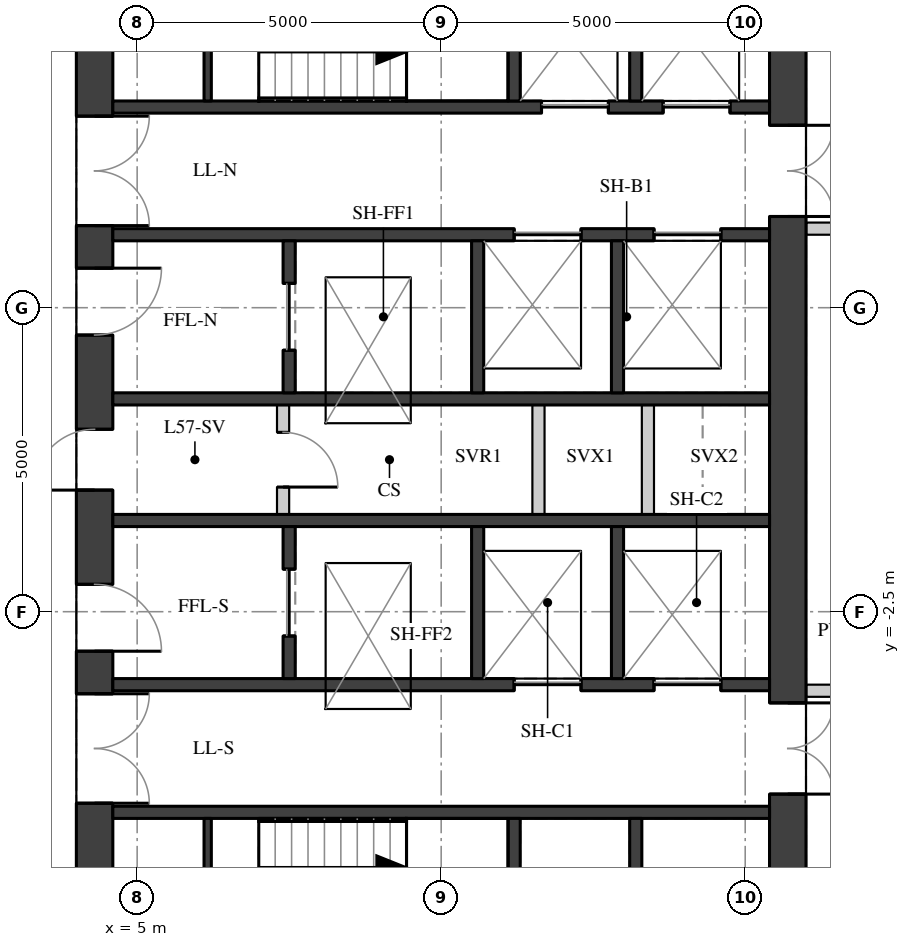
"""IFC4 building model, lengths in metres.
Left out: names, types, materials, properties, quantities, classifications, styles, units other than length and angle.
Written with IfcOpenShell. Run it as: python <this file> out.ifc"""

import sys

from ifc_helpers import new_model, si_unit, direction, frame, frame_2d, origin, place, context, subcontext, project, spatial, rectangle, extrude, element, fill, save


model = new_model("IFC4")
c1 = context("Model", 3, precision=1e-05, world=origin(), true_north=direction((0.0, 1.0)))
c2 = subcontext(c1, "Body", "Model", "MODEL_VIEW")
j1 = project(units=[si_unit("LENGTHUNIT", "METRE"), si_unit("PLANEANGLEUNIT", "RADIAN")], contexts=[c1])
p1 = place(None, origin())
s1 = spatial("IfcSite", under=j1, at=p1, CompositionType="ELEMENT")
p2 = place(p1, origin())
s2 = spatial("IfcBuilding", under=s1, at=p2, CompositionType="ELEMENT")
p3 = place(p2, frame((0.0, 0.0, 202.4)))
s3 = spatial("IfcBuildingStorey", under=s2, at=p3, CompositionType="ELEMENT", Elevation=202.4)
p4 = place(p3, frame((4.3, -9.4, 0.0), z_axis=(0.0, 0.0, 1.0), x_axis=(0.0, 1.0, 0.0)))
e1 = element("IfcWall", 1, at=p4, inside=s3, PredefinedType="SHEAR", context=c2, shape_type="SweptSolid", body=[
    extrude(rectangle(XDim=18.8, YDim=0.6, at=frame_2d((9.4, 0.0))), origin(), (0.0, 0.0, 1.0), 3.02),
])
p5 = place(p4, frame((0.65, 0.0, 0.0)))
e2 = element("IfcOpeningElement", 2, at=p5, cuts=e1, PredefinedType="OPENING", context=c2, shape_type="SweptSolid", body=[
    extrude(rectangle(XDim=1.5, YDim=2.1, at=frame_2d((0.75, 1.05))), frame((0.0, 0.31, 0.0), z_axis=(0.0, -1.0, 0.0), x_axis=(1.0, 0.0, 0.0)), (0.0, 0.0, 1.0), 0.62),
])
p6 = place(p4, frame((3.75, 0.0, 0.0)))
e3 = element("IfcOpeningElement", 3, at=p6, cuts=e1, PredefinedType="OPENING", context=c2, shape_type="SweptSolid", body=[
    extrude(rectangle(XDim=1.8, YDim=2.1, at=frame_2d((0.9, 1.05))), frame((0.0, 0.31, 0.0), z_axis=(0.0, -1.0, 0.0), x_axis=(1.0, 0.0, 0.0)), (0.0, 0.0, 1.0), 0.62),
])
p7 = place(p4, frame((6.25, 0.0, 0.0)))
e4 = element("IfcOpeningElement", 4, at=p7, cuts=e1, PredefinedType="OPENING", context=c2, shape_type="SweptSolid", body=[
    extrude(rectangle(XDim=1.1, YDim=2.1, at=frame_2d((0.55, 1.05))), frame((0.0, 0.31, 0.0), z_axis=(0.0, -1.0, 0.0), x_axis=(1.0, 0.0, 0.0)), (0.0, 0.0, 1.0), 0.62),
])
p8 = place(p4, frame((8.9, 0.0, 0.0)))
e5 = element("IfcOpeningElement", 5, at=p8, cuts=e1, PredefinedType="OPENING", context=c2, shape_type="SweptSolid", body=[
    extrude(rectangle(XDim=1.0, YDim=2.1, at=frame_2d((0.5, 1.05))), frame((0.0, 0.31, 0.0), z_axis=(0.0, -1.0, 0.0), x_axis=(1.0, 0.0, 0.0)), (0.0, 0.0, 1.0), 0.62),
])
p9 = place(p4, frame((11.45, 0.0, 0.0)))
e6 = element("IfcOpeningElement", 6, at=p9, cuts=e1, PredefinedType="OPENING", context=c2, shape_type="SweptSolid", body=[
    extrude(rectangle(XDim=1.1, YDim=2.1, at=frame_2d((0.55, 1.05))), frame((0.0, 0.31, 0.0), z_axis=(0.0, -1.0, 0.0), x_axis=(1.0, 0.0, 0.0)), (0.0, 0.0, 1.0), 0.62),
])
p10 = place(p4, frame((13.25, 0.0, 0.0)))
e7 = element("IfcOpeningElement", 7, at=p10, cuts=e1, PredefinedType="OPENING", context=c2, shape_type="SweptSolid", body=[
    extrude(rectangle(XDim=1.8, YDim=2.1, at=frame_2d((0.9, 1.05))), frame((0.0, 0.31, 0.0), z_axis=(0.0, -1.0, 0.0), x_axis=(1.0, 0.0, 0.0)), (0.0, 0.0, 1.0), 0.62),
])
p11 = place(p4, frame((16.65, 0.0, 0.0)))
e8 = element("IfcOpeningElement", 8, at=p11, cuts=e1, PredefinedType="OPENING", context=c2, shape_type="SweptSolid", body=[
    extrude(rectangle(XDim=1.5, YDim=2.1, at=frame_2d((0.75, 1.05))), frame((0.0, 0.31, 0.0), z_axis=(0.0, -1.0, 0.0), x_axis=(1.0, 0.0, 0.0)), (0.0, 0.0, 1.0), 0.62),
])
p12 = place(p3, frame((15.7, -9.4, 0.0), z_axis=(0.0, 0.0, 1.0), x_axis=(0.0, 1.0, 0.0)))
e9 = element("IfcWall", 9, at=p12, inside=s3, PredefinedType="SHEAR", context=c2, shape_type="SweptSolid", body=[
    extrude(rectangle(XDim=18.8, YDim=0.6, at=frame_2d((9.4, 0.0))), origin(), (0.0, 0.0, 1.0), 3.02),
])
p13 = place(p12, frame((13.4, 0.0, 0.0)))
e10 = element("IfcOpeningElement", 10, at=p13, cuts=e9, PredefinedType="OPENING", context=c2, shape_type="SweptSolid", body=[
    extrude(rectangle(XDim=1.5, YDim=2.1, at=frame_2d((0.75, 1.05))), frame((0.0, 0.31, 0.0), z_axis=(0.0, -1.0, 0.0), x_axis=(1.0, 0.0, 0.0)), (0.0, 0.0, 1.0), 0.62),
])
p14 = place(p12, frame((3.9, 0.0, 0.0)))
e11 = element("IfcOpeningElement", 11, at=p14, cuts=e9, PredefinedType="OPENING", context=c2, shape_type="SweptSolid", body=[
    extrude(rectangle(XDim=1.5, YDim=2.1, at=frame_2d((0.75, 1.05))), frame((0.0, 0.31, 0.0), z_axis=(0.0, -1.0, 0.0), x_axis=(1.0, 0.0, 0.0)), (0.0, 0.0, 1.0), 0.62),
])
p15 = place(p3, frame((4.6, 5.8, 0.0), z_axis=(0.0, 0.0, 1.0), x_axis=(1.0, 0.0, 0.0)))
e12 = element("IfcWall", 12, at=p15, inside=s3, PredefinedType="SHEAR", context=c2, shape_type="SweptSolid", body=[
    extrude(rectangle(XDim=10.8, YDim=0.2, at=frame_2d((5.4, 0.0))), origin(), (0.0, 0.0, 1.0), 3.02),
])
p16 = place(p15, frame((7.05, 0.0, 0.0)))
e13 = element("IfcOpeningElement", 13, at=p16, cuts=e12, PredefinedType="OPENING", context=c2, shape_type="SweptSolid", body=[
    extrude(rectangle(XDim=1.1, YDim=2.1, at=frame_2d((0.55, 1.05))), frame((0.0, 0.11, 0.0), z_axis=(0.0, -1.0, 0.0), x_axis=(1.0, 0.0, 0.0)), (0.0, 0.0, 1.0), 0.22),
])
p17 = place(p15, frame((9.05, 0.0, 0.0)))
e14 = element("IfcOpeningElement", 14, at=p17, cuts=e12, PredefinedType="OPENING", context=c2, shape_type="SweptSolid", body=[
    extrude(rectangle(XDim=1.1, YDim=2.1, at=frame_2d((0.55, 1.05))), frame((0.0, 0.11, 0.0), z_axis=(0.0, -1.0, 0.0), x_axis=(1.0, 0.0, 0.0)), (0.0, 0.0, 1.0), 0.22),
])
p18 = place(p3, frame((4.6, 3.7, 0.0), z_axis=(0.0, 0.0, 1.0), x_axis=(1.0, 0.0, 0.0)))
e15 = element("IfcWall", 15, at=p18, inside=s3, PredefinedType="SHEAR", context=c2, shape_type="SweptSolid", body=[
    extrude(rectangle(XDim=10.8, YDim=0.2, at=frame_2d((5.4, 0.0))), origin(), (0.0, 0.0, 1.0), 3.02),
])
p19 = place(p18, frame((6.6, 0.0, 0.0)))
e16 = element("IfcOpeningElement", 16, at=p19, cuts=e15, PredefinedType="OPENING", context=c2, shape_type="SweptSolid", body=[
    extrude(rectangle(XDim=1.1, YDim=2.1, at=frame_2d((0.55, 1.05))), frame((0.0, 0.11, 0.0), z_axis=(0.0, -1.0, 0.0), x_axis=(1.0, 0.0, 0.0)), (0.0, 0.0, 1.0), 0.22),
])
p20 = place(p18, frame((8.9, 0.0, 0.0)))
e17 = element("IfcOpeningElement", 17, at=p20, cuts=e15, PredefinedType="OPENING", context=c2, shape_type="SweptSolid", body=[
    extrude(rectangle(XDim=1.1, YDim=2.1, at=frame_2d((0.55, 1.05))), frame((0.0, 0.11, 0.0), z_axis=(0.0, -1.0, 0.0), x_axis=(1.0, 0.0, 0.0)), (0.0, 0.0, 1.0), 0.22),
])
for number, where, z_axis, x_axis in (
    (18, (4.6, 1.0, 0.0), (0.0, 0.0, 1.0), (1.0, 0.0, 0.0)),
    (19, (4.6, -1.0, 0.0), (0.0, 0.0, 1.0), (1.0, 0.0, 0.0)),
):
    element("IfcWall", number, at=place(p3, frame(where, z_axis=z_axis, x_axis=x_axis)), inside=s3, PredefinedType="SHEAR", context=c2, shape_type="SweptSolid", body=[
        extrude(rectangle(XDim=10.8, YDim=0.2, at=frame_2d((5.4, 0.0))), origin(), (0.0, 0.0, 1.0), 3.02),
    ])
p21 = place(p3, frame((4.6, -3.7, 0.0), z_axis=(0.0, 0.0, 1.0), x_axis=(1.0, 0.0, 0.0)))
e20 = element("IfcWall", 20, at=p21, inside=s3, PredefinedType="SHEAR", context=c2, shape_type="SweptSolid", body=[
    extrude(rectangle(XDim=10.8, YDim=0.2, at=frame_2d((5.4, 0.0))), origin(), (0.0, 0.0, 1.0), 3.02),
])
p22 = place(p21, frame((6.6, 0.0, 0.0)))
e21 = element("IfcOpeningElement", 21, at=p22, cuts=e20, PredefinedType="OPENING", context=c2, shape_type="SweptSolid", body=[
    extrude(rectangle(XDim=1.1, YDim=2.1, at=frame_2d((0.55, 1.05))), frame((0.0, 0.11, 0.0), z_axis=(0.0, -1.0, 0.0), x_axis=(1.0, 0.0, 0.0)), (0.0, 0.0, 1.0), 0.22),
])
p23 = place(p21, frame((8.9, 0.0, 0.0)))
e22 = element("IfcOpeningElement", 22, at=p23, cuts=e20, PredefinedType="OPENING", context=c2, shape_type="SweptSolid", body=[
    extrude(rectangle(XDim=1.1, YDim=2.1, at=frame_2d((0.55, 1.05))), frame((0.0, 0.11, 0.0), z_axis=(0.0, -1.0, 0.0), x_axis=(1.0, 0.0, 0.0)), (0.0, 0.0, 1.0), 0.22),
])
p24 = place(p3, frame((4.6, -5.8, 0.0), z_axis=(0.0, 0.0, 1.0), x_axis=(1.0, 0.0, 0.0)))
e23 = element("IfcWall", 23, at=p24, inside=s3, PredefinedType="SHEAR", context=c2, shape_type="SweptSolid", body=[
    extrude(rectangle(XDim=10.8, YDim=0.2, at=frame_2d((5.4, 0.0))), origin(), (0.0, 0.0, 1.0), 3.02),
])
for number, where, z_axis, x_axis in (
    (24, (11.2, 5.9, 0.0), (0.0, 0.0, 1.0), (0.0, 1.0, 0.0)),
    (25, (11.2, -9.4, 0.0), (0.0, 0.0, 1.0), (0.0, 1.0, 0.0)),
    (26, (13.2, 5.9, 0.0), (0.0, 0.0, 1.0), (0.0, 1.0, 0.0)),
    (27, (13.2, -9.4, 0.0), (0.0, 0.0, 1.0), (0.0, 1.0, 0.0)),
):
    element("IfcWall", number, at=place(p3, frame(where, z_axis=z_axis, x_axis=x_axis)), inside=s3, PredefinedType="SHEAR", context=c2, shape_type="SweptSolid", body=[
        extrude(rectangle(XDim=3.5, YDim=0.2, at=frame_2d((1.75, 0.0))), origin(), (0.0, 0.0, 1.0), 3.02),
    ])
p25 = place(p3, frame((7.5, 1.1, 0.0), z_axis=(0.0, 0.0, 1.0), x_axis=(0.0, 1.0, 0.0)))
e28 = element("IfcWall", 28, at=p25, inside=s3, PredefinedType="SHEAR", context=c2, shape_type="SweptSolid", body=[
    extrude(rectangle(XDim=2.5, YDim=0.2, at=frame_2d((1.25, 0.0))), origin(), (0.0, 0.0, 1.0), 3.02),
])
p26 = place(p25, frame((0.7, 0.0, 0.0)))
e29 = element("IfcOpeningElement", 29, at=p26, cuts=e28, PredefinedType="OPENING", context=c2, shape_type="SweptSolid", body=[
    extrude(rectangle(XDim=1.1, YDim=2.1, at=frame_2d((0.55, 1.05))), frame((0.0, 0.11, 0.0), z_axis=(0.0, -1.0, 0.0), x_axis=(1.0, 0.0, 0.0)), (0.0, 0.0, 1.0), 0.22),
])
p27 = place(p3, frame((7.5, -3.6, 0.0), z_axis=(0.0, 0.0, 1.0), x_axis=(0.0, 1.0, 0.0)))
e30 = element("IfcWall", 30, at=p27, inside=s3, PredefinedType="SHEAR", context=c2, shape_type="SweptSolid", body=[
    extrude(rectangle(XDim=2.5, YDim=0.2, at=frame_2d((1.25, 0.0))), origin(), (0.0, 0.0, 1.0), 3.02),
])
p28 = place(p27, frame((0.7, 0.0, 0.0)))
e31 = element("IfcOpeningElement", 31, at=p28, cuts=e30, PredefinedType="OPENING", context=c2, shape_type="SweptSolid", body=[
    extrude(rectangle(XDim=1.1, YDim=2.1, at=frame_2d((0.55, 1.05))), frame((0.0, 0.11, 0.0), z_axis=(0.0, -1.0, 0.0), x_axis=(1.0, 0.0, 0.0)), (0.0, 0.0, 1.0), 0.22),
])
for number, where, z_axis, x_axis in (
    (32, (10.6, 1.1, 0.0), (0.0, 0.0, 1.0), (0.0, 1.0, 0.0)),
    (33, (10.6, -3.6, 0.0), (0.0, 0.0, 1.0), (0.0, 1.0, 0.0)),
    (34, (12.9, 1.1, 0.0), (0.0, 0.0, 1.0), (0.0, 1.0, 0.0)),
    (35, (12.9, -3.6, 0.0), (0.0, 0.0, 1.0), (0.0, 1.0, 0.0)),
):
    element("IfcWall", number, at=place(p3, frame(where, z_axis=z_axis, x_axis=x_axis)), inside=s3, PredefinedType="SHEAR", context=c2, shape_type="SweptSolid", body=[
        extrude(rectangle(XDim=2.5, YDim=0.2, at=frame_2d((1.25, 0.0))), origin(), (0.0, 0.0, 1.0), 3.02),
    ])
p29 = place(p3, frame((6.16, 5.9, 0.0), z_axis=(0.0, 0.0, 1.0), x_axis=(0.0, 1.0, 0.0)))
e36 = element("IfcWall", 36, at=p29, inside=s3, PredefinedType="SHEAR", context=c2, shape_type="SweptSolid", body=[
    extrude(rectangle(XDim=3.5, YDim=0.12, at=frame_2d((1.75, 0.0))), origin(), (0.0, 0.0, 1.0), 3.02),
])
p30 = place(p29, frame((0.85, 0.0, 0.0)))
e37 = element("IfcOpeningElement", 37, at=p30, cuts=e36, PredefinedType="OPENING", context=c2, shape_type="SweptSolid", body=[
    extrude(rectangle(XDim=1.5, YDim=2.1, at=frame_2d((0.75, 1.05))), frame((0.0, 0.07, 0.0), z_axis=(0.0, -1.0, 0.0), x_axis=(1.0, 0.0, 0.0)), (0.0, 0.0, 1.0), 0.14),
])
p31 = place(p3, frame((6.16, -9.4, 0.0), z_axis=(0.0, 0.0, 1.0), x_axis=(0.0, 1.0, 0.0)))
e38 = element("IfcWall", 38, at=p31, inside=s3, PredefinedType="SHEAR", context=c2, shape_type="SweptSolid", body=[
    extrude(rectangle(XDim=3.5, YDim=0.12, at=frame_2d((1.75, 0.0))), origin(), (0.0, 0.0, 1.0), 3.02),
])
p32 = place(p31, frame((1.15, 0.0, 0.0)))
e39 = element("IfcOpeningElement", 39, at=p32, cuts=e38, PredefinedType="OPENING", context=c2, shape_type="SweptSolid", body=[
    extrude(rectangle(XDim=1.5, YDim=2.1, at=frame_2d((0.75, 1.05))), frame((0.0, 0.07, 0.0), z_axis=(0.0, -1.0, 0.0), x_axis=(1.0, 0.0, 0.0)), (0.0, 0.0, 1.0), 0.14),
])
p33 = place(p3, frame((7.4, -0.9, 0.0), z_axis=(0.0, 0.0, 1.0), x_axis=(0.0, 1.0, 0.0)))
e40 = element("IfcWall", 40, at=p33, inside=s3, PredefinedType="PARTITIONING", context=c2, shape_type="SweptSolid", body=[
    extrude(rectangle(XDim=1.8, YDim=0.2, at=frame_2d((0.9, 0.0))), origin(), (0.0, 0.0, 1.0), 3.02),
])
p34 = place(p33, frame((0.45, 0.0, 0.0)))
e41 = element("IfcOpeningElement", 41, at=p34, cuts=e40, PredefinedType="OPENING", context=c2, shape_type="SweptSolid", body=[
    extrude(rectangle(XDim=0.9, YDim=2.1, at=frame_2d((0.45, 1.05))), frame((0.0, 0.11, 0.0), z_axis=(0.0, -1.0, 0.0), x_axis=(1.0, 0.0, 0.0)), (0.0, 0.0, 1.0), 0.22),
])
for number, where, z_axis, x_axis in (
    (42, (11.6, -0.9, 0.0), (0.0, 0.0, 1.0), (0.0, 1.0, 0.0)),
    (43, (13.4, -0.9, 0.0), (0.0, 0.0, 1.0), (0.0, 1.0, 0.0)),
):
    element("IfcWall", number, at=place(p3, frame(where, z_axis=z_axis, x_axis=x_axis)), inside=s3, PredefinedType="PARTITIONING", context=c2, shape_type="SweptSolid", body=[
        extrude(rectangle(XDim=1.8, YDim=0.2, at=frame_2d((0.9, 0.0))), origin(), (0.0, 0.0, 1.0), 3.02),
    ])
p35 = place(p3, frame((17.6, 3.8, 0.0), z_axis=(0.0, 0.0, 1.0), x_axis=(-1.0, 0.0, 0.0)))
e44 = element("IfcWall", 44, at=p35, inside=s3, PredefinedType="PARTITIONING", context=c2, shape_type="SweptSolid", body=[
    extrude(rectangle(XDim=1.596, YDim=0.2, at=frame_2d((0.798, 0.0))), origin(), (0.0, 0.0, 1.0), 3.02),
])
p36 = place(p3, frame((16.004, -3.8, 0.0), z_axis=(0.0, 0.0, 1.0), x_axis=(1.0, 0.0, 0.0)))
e45 = element("IfcWall", 45, at=p36, inside=s3, PredefinedType="PARTITIONING", context=c2, shape_type="SweptSolid", body=[
    extrude(rectangle(XDim=1.596, YDim=0.2, at=frame_2d((0.798, 0.0))), origin(), (0.0, 0.0, 1.0), 2.47),
])
p37 = place(p6, origin())
e46 = element("IfcDoor", 46, at=p37, inside=s3, OperationType="DOUBLE_DOOR_SINGLE_SWING", PredefinedType="DOOR", context=c2, shape_type="SweptSolid", body=[
    extrude(rectangle(XDim=1.8, YDim=2.1, at=frame_2d((0.9, 1.05))), frame((0.0, 0.025, 0.0), z_axis=(0.0, -1.0, 0.0), x_axis=(1.0, 0.0, 0.0)), (0.0, 0.0, 1.0), 0.05),
])
fill(e3, e46)
p38 = place(p7, origin())
e47 = element("IfcDoor", 47, at=p38, inside=s3, OperationType="SINGLE_SWING_RIGHT", PredefinedType="DOOR", context=c2, shape_type="SweptSolid", body=[
    extrude(rectangle(XDim=1.1, YDim=2.1, at=frame_2d((0.55, 1.05))), frame((0.0, 0.025, 0.0), z_axis=(0.0, -1.0, 0.0), x_axis=(1.0, 0.0, 0.0)), (0.0, 0.0, 1.0), 0.05),
])
fill(e4, e47)
p39 = place(p8, origin())
e48 = element("IfcDoor", 48, at=p39, inside=s3, OperationType="SINGLE_SWING_LEFT", PredefinedType="DOOR", context=c2, shape_type="SweptSolid", body=[
    extrude(rectangle(XDim=1.0, YDim=2.1, at=frame_2d((0.5, 1.05))), frame((0.0, 0.025, 0.0), z_axis=(0.0, -1.0, 0.0), x_axis=(1.0, 0.0, 0.0)), (0.0, 0.0, 1.0), 0.05),
])
fill(e5, e48)
p40 = place(p9, origin())
e49 = element("IfcDoor", 49, at=p40, inside=s3, OperationType="SINGLE_SWING_LEFT", PredefinedType="DOOR", context=c2, shape_type="SweptSolid", body=[
    extrude(rectangle(XDim=1.1, YDim=2.1, at=frame_2d((0.55, 1.05))), frame((0.0, 0.025, 0.0), z_axis=(0.0, -1.0, 0.0), x_axis=(1.0, 0.0, 0.0)), (0.0, 0.0, 1.0), 0.05),
])
fill(e6, e49)
p41 = place(p10, origin())
e50 = element("IfcDoor", 50, at=p41, inside=s3, OperationType="DOUBLE_DOOR_SINGLE_SWING", PredefinedType="DOOR", context=c2, shape_type="SweptSolid", body=[
    extrude(rectangle(XDim=1.8, YDim=2.1, at=frame_2d((0.9, 1.05))), frame((0.0, 0.025, 0.0), z_axis=(0.0, -1.0, 0.0), x_axis=(1.0, 0.0, 0.0)), (0.0, 0.0, 1.0), 0.05),
])
fill(e7, e50)
p42 = place(p13, origin())
e51 = element("IfcDoor", 51, at=p42, inside=s3, OperationType="DOUBLE_DOOR_SINGLE_SWING", PredefinedType="DOOR", context=c2, shape_type="SweptSolid", body=[
    extrude(rectangle(XDim=1.5, YDim=2.1, at=frame_2d((0.75, 1.05))), frame((0.0, 0.025, 0.0), z_axis=(0.0, -1.0, 0.0), x_axis=(1.0, 0.0, 0.0)), (0.0, 0.0, 1.0), 0.05),
])
fill(e10, e51)
p43 = place(p14, origin())
e52 = element("IfcDoor", 52, at=p43, inside=s3, OperationType="DOUBLE_DOOR_SINGLE_SWING", PredefinedType="DOOR", context=c2, shape_type="SweptSolid", body=[
    extrude(rectangle(XDim=1.5, YDim=2.1, at=frame_2d((0.75, 1.05))), frame((0.0, 0.025, 0.0), z_axis=(0.0, -1.0, 0.0), x_axis=(1.0, 0.0, 0.0)), (0.0, 0.0, 1.0), 0.05),
])
fill(e11, e52)
p44 = place(p16, origin())
e53 = element("IfcDoor", 53, at=p44, inside=s3, OperationType="DOUBLE_DOOR_SLIDING", PredefinedType="DOOR", context=c2, shape_type="SweptSolid", body=[
    extrude(rectangle(XDim=1.1, YDim=2.1, at=frame_2d((0.55, 1.05))), frame((0.0, 0.025, 0.0), z_axis=(0.0, -1.0, 0.0), x_axis=(1.0, 0.0, 0.0)), (0.0, 0.0, 1.0), 0.05),
])
fill(e13, e53)
p45 = place(p17, origin())
e54 = element("IfcDoor", 54, at=p45, inside=s3, OperationType="DOUBLE_DOOR_SLIDING", PredefinedType="DOOR", context=c2, shape_type="SweptSolid", body=[
    extrude(rectangle(XDim=1.1, YDim=2.1, at=frame_2d((0.55, 1.05))), frame((0.0, 0.025, 0.0), z_axis=(0.0, -1.0, 0.0), x_axis=(1.0, 0.0, 0.0)), (0.0, 0.0, 1.0), 0.05),
])
fill(e14, e54)
p46 = place(p19, origin())
e55 = element("IfcDoor", 55, at=p46, inside=s3, OperationType="DOUBLE_DOOR_SLIDING", PredefinedType="DOOR", context=c2, shape_type="SweptSolid", body=[
    extrude(rectangle(XDim=1.1, YDim=2.1, at=frame_2d((0.55, 1.05))), frame((0.0, 0.025, 0.0), z_axis=(0.0, -1.0, 0.0), x_axis=(1.0, 0.0, 0.0)), (0.0, 0.0, 1.0), 0.05),
])
fill(e16, e55)
p47 = place(p20, origin())
e56 = element("IfcDoor", 56, at=p47, inside=s3, OperationType="DOUBLE_DOOR_SLIDING", PredefinedType="DOOR", context=c2, shape_type="SweptSolid", body=[
    extrude(rectangle(XDim=1.1, YDim=2.1, at=frame_2d((0.55, 1.05))), frame((0.0, 0.025, 0.0), z_axis=(0.0, -1.0, 0.0), x_axis=(1.0, 0.0, 0.0)), (0.0, 0.0, 1.0), 0.05),
])
fill(e17, e56)
p48 = place(p22, origin())
e57 = element("IfcDoor", 57, at=p48, inside=s3, OperationType="DOUBLE_DOOR_SLIDING", PredefinedType="DOOR", context=c2, shape_type="SweptSolid", body=[
    extrude(rectangle(XDim=1.1, YDim=2.1, at=frame_2d((0.55, 1.05))), frame((0.0, 0.025, 0.0), z_axis=(0.0, -1.0, 0.0), x_axis=(1.0, 0.0, 0.0)), (0.0, 0.0, 1.0), 0.05),
])
fill(e21, e57)
p49 = place(p23, origin())
e58 = element("IfcDoor", 58, at=p49, inside=s3, OperationType="DOUBLE_DOOR_SLIDING", PredefinedType="DOOR", context=c2, shape_type="SweptSolid", body=[
    extrude(rectangle(XDim=1.1, YDim=2.1, at=frame_2d((0.55, 1.05))), frame((0.0, 0.025, 0.0), z_axis=(0.0, -1.0, 0.0), x_axis=(1.0, 0.0, 0.0)), (0.0, 0.0, 1.0), 0.05),
])
fill(e22, e58)
p50 = place(p26, origin())
e59 = element("IfcDoor", 59, at=p50, inside=s3, OperationType="DOUBLE_DOOR_SLIDING", PredefinedType="DOOR", context=c2, shape_type="SweptSolid", body=[
    extrude(rectangle(XDim=1.1, YDim=2.1, at=frame_2d((0.55, 1.05))), frame((0.0, 0.025, 0.0), z_axis=(0.0, -1.0, 0.0), x_axis=(1.0, 0.0, 0.0)), (0.0, 0.0, 1.0), 0.05),
])
fill(e29, e59)
p51 = place(p28, origin())
e60 = element("IfcDoor", 60, at=p51, inside=s3, OperationType="DOUBLE_DOOR_SLIDING", PredefinedType="DOOR", context=c2, shape_type="SweptSolid", body=[
    extrude(rectangle(XDim=1.1, YDim=2.1, at=frame_2d((0.55, 1.05))), frame((0.0, 0.025, 0.0), z_axis=(0.0, -1.0, 0.0), x_axis=(1.0, 0.0, 0.0)), (0.0, 0.0, 1.0), 0.05),
])
fill(e31, e60)
p52 = place(p34, origin())
e61 = element("IfcDoor", 61, at=p52, inside=s3, OperationType="SINGLE_SWING_RIGHT", PredefinedType="DOOR", context=c2, shape_type="SweptSolid", body=[
    extrude(rectangle(XDim=0.9, YDim=2.1, at=frame_2d((0.45, 1.05))), frame((0.0, 0.025, 0.0), z_axis=(0.0, -1.0, 0.0), x_axis=(1.0, 0.0, 0.0)), (0.0, 0.0, 1.0), 0.05),
])
fill(e41, e61)
save(model, sys.argv[1])
